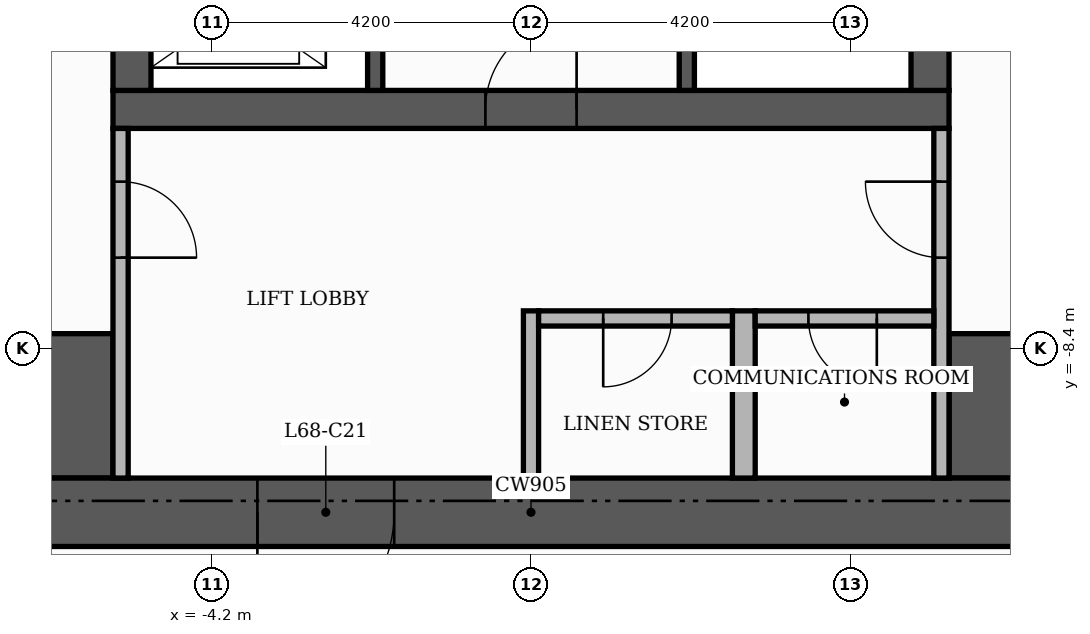
"""IFC4 building model, lengths in metres.
Left out: names, types, materials, properties, quantities, classifications, styles, units other than length and angle.
Written with IfcOpenShell. Run it as: python <this file> out.ifc"""

import sys

from ifc_helpers import new_model, si_unit, direction, frame, frame_2d, origin, place, context, subcontext, project, spatial, rectangle, extrude, element, fill, save


model = new_model("IFC4")
c1 = context("Model", 3, precision=1e-05, world=origin(), true_north=direction((0.0, 1.0)))
c2 = subcontext(c1, "Body", "Model", "MODEL_VIEW")
j1 = project(units=[si_unit("LENGTHUNIT", "METRE"), si_unit("PLANEANGLEUNIT", "RADIAN")], contexts=[c1])
p1 = place(None, origin())
s1 = spatial("IfcSite", under=j1, at=p1, CompositionType="ELEMENT")
p2 = place(p1, origin())
s2 = spatial("IfcBuilding", under=s1, at=p2, CompositionType="ELEMENT")
p3 = place(p2, frame((0.0, 0.0, 283.5)))
s3 = spatial("IfcBuildingStorey", under=s2, at=p3, CompositionType="ELEMENT", Elevation=283.5)
p4 = place(p3, frame((-5.5, -5.25, 0.0), z_axis=(0.0, 0.0, 1.0), x_axis=(1.0, 0.0, 0.0)))
e1 = element("IfcWall", 1, at=p4, inside=s3, PredefinedType="SHEAR", context=c2, shape_type="SweptSolid", body=[
    extrude(rectangle(XDim=11.0, YDim=0.5, at=frame_2d((5.5, 0.0))), origin(), (0.0, 0.0, 1.0), 3.4),
])
p5 = place(p4, frame((4.9, 0.0, 0.0)))
e2 = element("IfcOpeningElement", 2, at=p5, cuts=e1, PredefinedType="OPENING", context=c2, shape_type="SweptSolid", body=[
    extrude(rectangle(XDim=1.2, YDim=2.1, at=frame_2d((0.6, 1.05))), frame((0.0, 0.26, 0.0), z_axis=(0.0, -1.0, 0.0), x_axis=(1.0, 0.0, 0.0)), (0.0, 0.0, 1.0), 0.52),
])
for number, where, z_axis, x_axis in (
    (3, (-5.25, -5.0, 0.0), (0.0, 0.0, 1.0), (0.0, 1.0, 0.0)),
    (4, (5.25, -5.0, 0.0), (0.0, 0.0, 1.0), (0.0, 1.0, 0.0)),
):
    element("IfcWall", number, at=place(p3, frame(where, z_axis=z_axis, x_axis=x_axis)), inside=s3, PredefinedType="SHEAR", context=c2, shape_type="SweptSolid", body=[
        extrude(rectangle(XDim=10.5, YDim=0.5, at=frame_2d((5.25, 0.0))), origin(), (0.0, 0.0, 1.0), 3.4),
    ])
for number, where, z_axis, x_axis in (
    (5, (-10.1, -9.15, 0.0), (0.0, 0.0, 1.0), (1.0, 0.0, 0.0)),
    (6, (5.5, -9.15, 0.0), (0.0, 0.0, 1.0), (1.0, 0.0, 0.0)),
):
    element("IfcWall", number, at=place(p3, frame(where, z_axis=z_axis, x_axis=x_axis)), inside=s3, PredefinedType="SHEAR", context=c2, shape_type="SweptSolid", body=[
        extrude(rectangle(XDim=4.6, YDim=1.9, at=frame_2d((2.3, 0.0))), origin(), (0.0, 0.0, 1.0), 3.4),
    ])
p6 = place(p3, frame((2.05, -5.0, 0.0), z_axis=(0.0, 0.0, 1.0), x_axis=(0.0, 1.0, 0.0)))
e7 = element("IfcWall", 7, at=p6, inside=s3, PredefinedType="SHEAR", context=c2, shape_type="SweptSolid", body=[
    extrude(rectangle(XDim=6.6, YDim=0.2, at=frame_2d((3.3, 0.0))), origin(), (0.0, 0.0, 1.0), 3.4),
])
p7 = place(p6, frame((5.25, 0.0, 0.0)))
e8 = element("IfcOpeningElement", 8, at=p7, cuts=e7, PredefinedType="OPENING", context=c2, shape_type="SweptSolid", body=[
    extrude(rectangle(XDim=1.0, YDim=2.1, at=frame_2d((0.5, 1.05))), frame((0.0, 0.11, 0.0), z_axis=(0.0, -1.0, 0.0), x_axis=(1.0, 0.0, 0.0)), (0.0, 0.0, 1.0), 0.22),
])
p8 = place(p3, frame((-2.05, -5.0, 0.0), z_axis=(0.0, 0.0, 1.0), x_axis=(0.0, 1.0, 0.0)))
e9 = element("IfcWall", 9, at=p8, inside=s3, PredefinedType="SHEAR", context=c2, shape_type="SweptSolid", body=[
    extrude(rectangle(XDim=3.4, YDim=0.2, at=frame_2d((1.7, 0.0))), origin(), (0.0, 0.0, 1.0), 3.4),
])
p9 = place(p8, frame((0.55, 0.0, 0.0)))
e10 = element("IfcOpeningElement", 10, at=p9, cuts=e9, PredefinedType="OPENING", context=c2, shape_type="SweptSolid", body=[
    extrude(rectangle(XDim=1.1, YDim=2.1, at=frame_2d((0.55, 1.05))), frame((0.0, 0.11, 0.0), z_axis=(0.0, -1.0, 0.0), x_axis=(1.0, 0.0, 0.0)), (0.0, 0.0, 1.0), 0.22),
])
p10 = place(p8, frame((2.45, 0.0, 0.0)))
e11 = element("IfcOpeningElement", 11, at=p10, cuts=e9, PredefinedType="OPENING", context=c2, shape_type="SweptSolid", body=[
    extrude(rectangle(XDim=0.8, YDim=2.1, at=frame_2d((0.4, 1.05))), frame((0.0, 0.11, 0.0), z_axis=(0.0, -1.0, 0.0), x_axis=(1.0, 0.0, 0.0)), (0.0, 0.0, 1.0), 0.22),
])
p11 = place(p3, frame((-11.0, -10.55, 0.0), z_axis=(0.0, 0.0, 1.0), x_axis=(1.0, 0.0, 0.0)))
e12 = element("IfcWall", 12, at=p11, inside=s3, PredefinedType="SHEAR", context=c2, shape_type="SweptSolid", body=[
    extrude(rectangle(XDim=22.0, YDim=0.9, at=frame_2d((11.0, 0.0))), origin(), (0.0, 0.0, 1.0), 3.4),
])
p12 = place(p11, frame((7.4, 0.0, 0.0)))
e13 = element("IfcOpeningElement", 13, at=p12, cuts=e12, PredefinedType="OPENING", context=c2, shape_type="SweptSolid", body=[
    extrude(rectangle(XDim=1.8, YDim=2.2, at=frame_2d((0.9, 1.1))), frame((0.0, 0.46, 0.0), z_axis=(0.0, -1.0, 0.0), x_axis=(1.0, 0.0, 0.0)), (0.0, 0.0, 1.0), 0.92),
])
p13 = place(p3, frame((-5.4, -10.1, 0.0), z_axis=(0.0, 0.0, 1.0), x_axis=(0.0, 1.0, 0.0)))
e14 = element("IfcWall", 14, at=p13, inside=s3, PredefinedType="PARTITIONING", context=c2, shape_type="SweptSolid", body=[
    extrude(rectangle(XDim=4.6, YDim=0.2, at=frame_2d((2.3, 0.0))), origin(), (0.0, 0.0, 1.0), 3.4),
])
p14 = place(p13, frame((2.9, 0.0, 0.0)))
e15 = element("IfcOpeningElement", 15, at=p14, cuts=e14, PredefinedType="OPENING", context=c2, shape_type="SweptSolid", body=[
    extrude(rectangle(XDim=1.0, YDim=2.1, at=frame_2d((0.5, 1.05))), frame((0.0, 0.11, 0.0), z_axis=(0.0, -1.0, 0.0), x_axis=(1.0, 0.0, 0.0)), (0.0, 0.0, 1.0), 0.22),
])
p15 = place(p3, frame((0.0, -10.1, 0.0), z_axis=(0.0, 0.0, 1.0), x_axis=(0.0, 1.0, 0.0)))
e16 = element("IfcWall", 16, at=p15, inside=s3, PredefinedType="PARTITIONING", context=c2, shape_type="SweptSolid", body=[
    extrude(rectangle(XDim=2.2, YDim=0.2, at=frame_2d((1.1, 0.0))), origin(), (0.0, 0.0, 1.0), 3.4),
])
p16 = place(p3, frame((2.8, -10.1, 0.0), z_axis=(0.0, 0.0, 1.0), x_axis=(0.0, 1.0, 0.0)))
e17 = element("IfcWall", 17, at=p16, inside=s3, PredefinedType="PARTITIONING", context=c2, shape_type="SweptSolid", body=[
    extrude(rectangle(XDim=2.2, YDim=0.3, at=frame_2d((1.1, 0.0))), origin(), (0.0, 0.0, 1.0), 3.4),
])
p17 = place(p3, frame((5.4, -10.1, 0.0), z_axis=(0.0, 0.0, 1.0), x_axis=(0.0, 1.0, 0.0)))
e18 = element("IfcWall", 18, at=p17, inside=s3, PredefinedType="PARTITIONING", context=c2, shape_type="SweptSolid", body=[
    extrude(rectangle(XDim=4.6, YDim=0.2, at=frame_2d((2.3, 0.0))), origin(), (0.0, 0.0, 1.0), 3.4),
])
p18 = place(p17, frame((2.9, 0.0, 0.0)))
e19 = element("IfcOpeningElement", 19, at=p18, cuts=e18, PredefinedType="OPENING", context=c2, shape_type="SweptSolid", body=[
    extrude(rectangle(XDim=1.0, YDim=2.1, at=frame_2d((0.5, 1.05))), frame((0.0, 0.11, 0.0), z_axis=(0.0, -1.0, 0.0), x_axis=(1.0, 0.0, 0.0)), (0.0, 0.0, 1.0), 0.22),
])
p19 = place(p3, frame((0.1, -8.0, 0.0), z_axis=(0.0, 0.0, 1.0), x_axis=(1.0, 0.0, 0.0)))
e20 = element("IfcWall", 20, at=p19, inside=s3, PredefinedType="PARTITIONING", context=c2, shape_type="SweptSolid", body=[
    extrude(rectangle(XDim=2.55, YDim=0.2, at=frame_2d((1.275, 0.0))), origin(), (0.0, 0.0, 1.0), 3.4),
])
p20 = place(p19, frame((0.85, 0.0, 0.0)))
e21 = element("IfcOpeningElement", 21, at=p20, cuts=e20, PredefinedType="OPENING", context=c2, shape_type="SweptSolid", body=[
    extrude(rectangle(XDim=0.9, YDim=2.1, at=frame_2d((0.45, 1.05))), frame((0.0, 0.11, 0.0), z_axis=(0.0, -1.0, 0.0), x_axis=(1.0, 0.0, 0.0)), (0.0, 0.0, 1.0), 0.22),
])
p21 = place(p3, frame((2.95, -8.0, 0.0), z_axis=(0.0, 0.0, 1.0), x_axis=(1.0, 0.0, 0.0)))
e22 = element("IfcWall", 22, at=p21, inside=s3, PredefinedType="PARTITIONING", context=c2, shape_type="SweptSolid", body=[
    extrude(rectangle(XDim=2.35, YDim=0.2, at=frame_2d((1.175, 0.0))), origin(), (0.0, 0.0, 1.0), 3.4),
])
p22 = place(p21, frame((0.7, 0.0, 0.0)))
e23 = element("IfcOpeningElement", 23, at=p22, cuts=e22, PredefinedType="OPENING", context=c2, shape_type="SweptSolid", body=[
    extrude(rectangle(XDim=0.9, YDim=2.1, at=frame_2d((0.45, 1.05))), frame((0.0, 0.11, 0.0), z_axis=(0.0, -1.0, 0.0), x_axis=(1.0, 0.0, 0.0)), (0.0, 0.0, 1.0), 0.22),
])
p23 = place(p5, origin())
e24 = element("IfcDoor", 24, at=p23, inside=s3, OperationType="SINGLE_SWING_RIGHT", PredefinedType="DOOR", context=c2, shape_type="SweptSolid", body=[
    extrude(rectangle(XDim=1.2, YDim=2.1, at=frame_2d((0.6, 1.05))), frame((0.0, 0.025, 0.0), z_axis=(0.0, -1.0, 0.0), x_axis=(1.0, 0.0, 0.0)), (0.0, 0.0, 1.0), 0.05),
])
fill(e2, e24)
p24 = place(p14, frame((1.0, 0.0, 0.0), z_axis=(0.0, 0.0, 1.0), x_axis=(-1.0, 0.0, 0.0)))
e25 = element("IfcDoor", 25, at=p24, inside=s3, OperationType="SINGLE_SWING_LEFT", PredefinedType="DOOR", context=c2, shape_type="SweptSolid", body=[
    extrude(rectangle(XDim=1.0, YDim=2.1, at=frame_2d((0.5, 1.05))), frame((0.0, 0.025, 0.0), z_axis=(0.0, -1.0, 0.0), x_axis=(1.0, 0.0, 0.0)), (0.0, 0.0, 1.0), 0.05),
])
fill(e15, e25)
p25 = place(p18, origin())
e26 = element("IfcDoor", 26, at=p25, inside=s3, OperationType="SINGLE_SWING_RIGHT", PredefinedType="DOOR", context=c2, shape_type="SweptSolid", body=[
    extrude(rectangle(XDim=1.0, YDim=2.1, at=frame_2d((0.5, 1.05))), frame((0.0, 0.025, 0.0), z_axis=(0.0, -1.0, 0.0), x_axis=(1.0, 0.0, 0.0)), (0.0, 0.0, 1.0), 0.05),
])
fill(e19, e26)
p26 = place(p12, frame((1.8, 0.0, 0.0), z_axis=(0.0, 0.0, 1.0), x_axis=(-1.0, 0.0, 0.0)))
e27 = element("IfcDoor", 27, at=p26, inside=s3, OperationType="DOUBLE_DOOR_SINGLE_SWING", PredefinedType="DOOR", context=c2, shape_type="SweptSolid", body=[
    extrude(rectangle(XDim=1.8, YDim=2.2, at=frame_2d((0.9, 1.1))), frame((0.0, 0.025, 0.0), z_axis=(0.0, -1.0, 0.0), x_axis=(1.0, 0.0, 0.0)), (0.0, 0.0, 1.0), 0.05),
])
fill(e13, e27)
p27 = place(p20, frame((0.9, 0.0, 0.0), z_axis=(0.0, 0.0, 1.0), x_axis=(-1.0, 0.0, 0.0)))
e28 = element("IfcDoor", 28, at=p27, inside=s3, OperationType="SINGLE_SWING_LEFT", PredefinedType="DOOR", context=c2, shape_type="SweptSolid", body=[
    extrude(rectangle(XDim=0.9, YDim=2.1, at=frame_2d((0.45, 1.05))), frame((0.0, 0.025, 0.0), z_axis=(0.0, -1.0, 0.0), x_axis=(1.0, 0.0, 0.0)), (0.0, 0.0, 1.0), 0.05),
])
fill(e21, e28)
p28 = place(p22, frame((0.9, 0.0, 0.0), z_axis=(0.0, 0.0, 1.0), x_axis=(-1.0, 0.0, 0.0)))
e29 = element("IfcDoor", 29, at=p28, inside=s3, OperationType="SINGLE_SWING_RIGHT", PredefinedType="DOOR", context=c2, shape_type="SweptSolid", body=[
    extrude(rectangle(XDim=0.9, YDim=2.1, at=frame_2d((0.45, 1.05))), frame((0.0, 0.025, 0.0), z_axis=(0.0, -1.0, 0.0), x_axis=(1.0, 0.0, 0.0)), (0.0, 0.0, 1.0), 0.05),
])
fill(e23, e29)
save(model, sys.argv[1])
